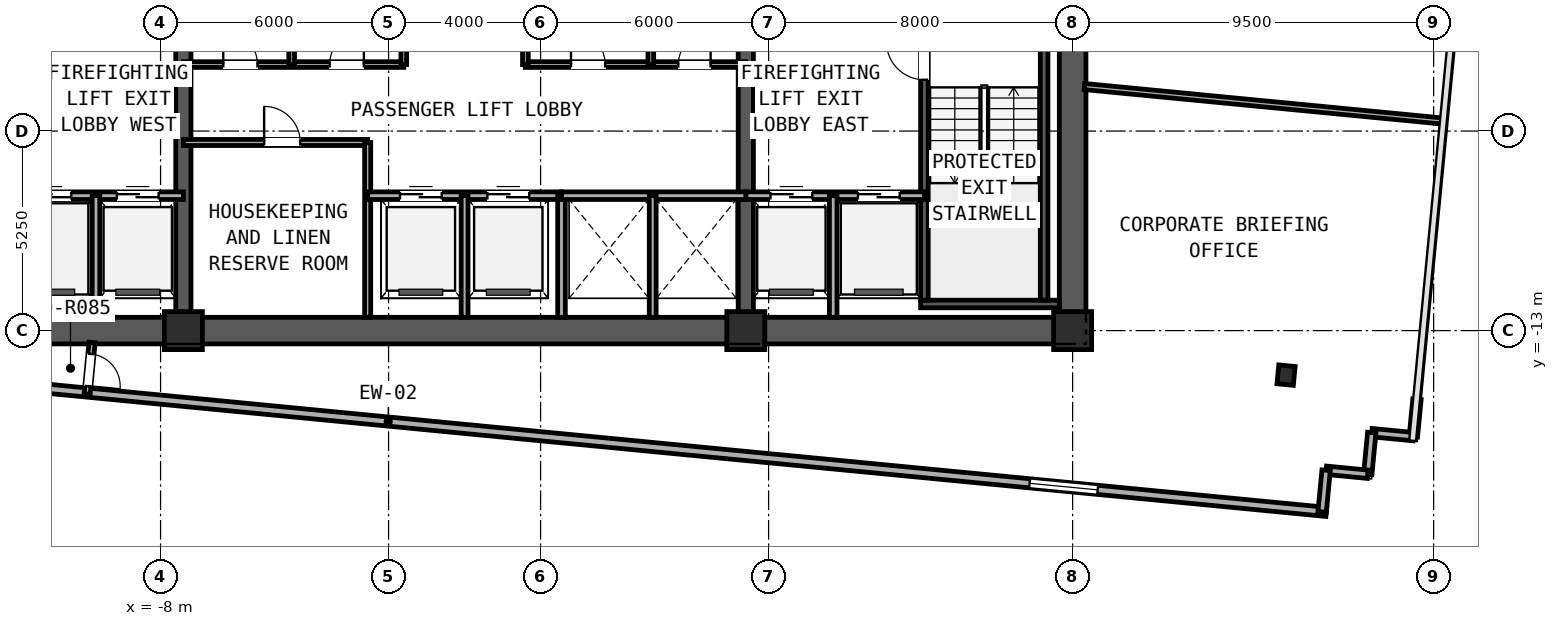
"""IFC4 building model, lengths in metres.
Left out: names, types, materials, properties, quantities, classifications, styles, units other than length and angle.
Written with IfcOpenShell. Run it as: python <this file> out.ifc"""

import sys

from ifc_helpers import new_model, si_unit, direction, frame, frame_2d, origin, origin_2d, place, context, subcontext, project, spatial, rectangle, i_section, extrude, element, fill, save


model = new_model("IFC4")
c1 = context("Model", 3, precision=1e-05, world=origin(), true_north=direction((0.0, 1.0)))
c2 = subcontext(c1, "Body", "Model", "MODEL_VIEW")
j1 = project(units=[si_unit("LENGTHUNIT", "METRE"), si_unit("PLANEANGLEUNIT", "RADIAN")], contexts=[c1])
p1 = place(None, origin())
s1 = spatial("IfcSite", under=j1, at=p1, CompositionType="ELEMENT")
p2 = place(p1, origin())
s2 = spatial("IfcBuilding", under=s1, at=p2, CompositionType="ELEMENT")
p3 = place(p2, frame((0.0, 0.0, 163.5)))
s3 = spatial("IfcBuildingStorey", under=s2, at=p3, CompositionType="ELEMENT", Elevation=163.5)
p4 = place(p3, frame((-16.35, -13.0, 0.0), z_axis=(0.0, 0.0, 1.0), x_axis=(1.0, 0.0, 0.0)))
e1 = element("IfcWall", 1, at=p4, inside=s3, PredefinedType="SHEAR", context=c2, shape_type="SweptSolid", body=[
    extrude(rectangle(XDim=32.7, YDim=0.7, at=frame_2d((16.35, 0.0))), origin(), (0.0, 0.0, 1.0), 2.91),
])
p5 = place(p3, frame((16.0, -12.65, 0.0), z_axis=(0.0, 0.0, 1.0), x_axis=(0.0, 1.0, 0.0)))
e2 = element("IfcWall", 2, at=p5, inside=s3, PredefinedType="SHEAR", context=c2, shape_type="SweptSolid", body=[
    extrude(rectangle(XDim=9.8, YDim=0.7, at=frame_2d((4.9, 0.0))), origin(), (0.0, 0.0, 1.0), 2.91),
])
for number, where, z_axis, x_axis in (
    (3, (-7.4, -12.65, 0.0), (0.0, 0.0, 1.0), (0.0, 1.0, 0.0)),
    (4, (7.4, -12.65, 0.0), (0.0, 0.0, 1.0), (0.0, 1.0, 0.0)),
):
    element("IfcWall", number, at=place(p3, frame(where, z_axis=z_axis, x_axis=x_axis)), inside=s3, PredefinedType="SHEAR", context=c2, shape_type="SweptSolid", body=[
        extrude(rectangle(XDim=9.8, YDim=0.4, at=frame_2d((4.9, 0.0))), origin(), (0.0, 0.0, 1.0), 3.19),
    ])
p6 = place(p3, frame((12.0, -12.3, 0.0), z_axis=(0.0, 0.0, 1.0), x_axis=(1.0, 0.0, 0.0)))
e5 = element("IfcWall", 5, at=p6, inside=s3, PredefinedType="SOLIDWALL", context=c2, shape_type="SweptSolid", body=[
    extrude(rectangle(XDim=3.65, YDim=0.2, at=frame_2d((1.825, 0.0))), origin(), (0.0, 0.0, 1.0), 3.19),
])
p7 = place(p3, frame((12.1, -12.2, 0.0), z_axis=(0.0, 0.0, 1.0), x_axis=(0.0, 1.0, 0.0)))
e6 = element("IfcWall", 6, at=p7, inside=s3, PredefinedType="SOLIDWALL", context=c2, shape_type="SweptSolid", body=[
    extrude(rectangle(XDim=7.0, YDim=0.2, at=frame_2d((3.5, 0.0))), origin(), (0.0, 0.0, 1.0), 3.19),
])
p8 = place(p7, frame((5.8, 0.0, 0.0)))
e7 = element("IfcOpeningElement", 7, at=p8, cuts=e6, PredefinedType="OPENING", context=c2, shape_type="SweptSolid", body=[
    extrude(rectangle(XDim=1.0, YDim=2.1, at=frame_2d((0.5, 1.05))), frame((0.0, 0.11, 0.0), z_axis=(0.0, -1.0, 0.0), x_axis=(1.0, 0.0, 0.0)), (0.0, 0.0, 1.0), 0.22),
])
p9 = place(p3, frame((15.25, -12.2, 0.0), z_axis=(0.0, 0.0, 1.0), x_axis=(0.0, 1.0, 0.0)))
e8 = element("IfcWall", 8, at=p9, inside=s3, PredefinedType="SOLIDWALL", context=c2, shape_type="SweptSolid", body=[
    extrude(rectangle(XDim=7.0, YDim=0.2, at=frame_2d((3.5, 0.0))), origin(), (0.0, 0.0, 1.0), 3.19),
])
for number, where, z_axis, x_axis in (
    (9, (-7.4, -13.0, 0.0), (0.0, 0.0, 1.0), (1.0, 0.0, 0.0)),
    (10, (7.4, -13.0, 0.0), (0.0, 0.0, 1.0), (1.0, 0.0, 0.0)),
    (11, (16.0, -13.0, 0.0), (0.0, 0.0, 1.0), (1.0, 0.0, 0.0)),
):
    element("IfcColumn", number, at=place(p3, frame(where, z_axis=z_axis, x_axis=x_axis)), inside=s3, PredefinedType="COLUMN", context=c2, shape_type="SweptSolid", body=[
        extrude(rectangle(XDim=1.0, YDim=1.0, at=origin_2d()), origin(), (0.0, 0.0, 1.0), 3.45),
    ])
p10 = place(p3, frame((21.616, -14.172, 0.0), z_axis=(0.0, 0.0, 1.0), x_axis=(0.995396198367, -0.09584575252, 0.0)))
e12 = element("IfcColumn", 12, at=p10, inside=s3, PredefinedType="COLUMN", context=c2, shape_type="SweptSolid", body=[
    extrude(i_section(OverallWidth=0.432, OverallDepth=0.498, WebThickness=0.056, FlangeThickness=0.089, FilletRadius=0.031, at=origin_2d()), origin(), (0.0, 0.0, 1.0), 3.45),
])
p11 = place(p3, frame((-26.695, -13.016, 0.0), z_axis=(0.0, 0.0, 1.0), x_axis=(0.995396268366, -0.095845025554, 0.0)))
e13 = element("IfcWall", 13, at=p11, inside=s3, PredefinedType="STANDARD", context=c2, shape_type="SweptSolid", body=[
    extrude(rectangle(XDim=49.6, YDim=0.24, at=frame_2d((24.8, 0.0))), origin(), (0.0, 0.0, 1.0), 3.19),
])
p12 = place(p11, frame((6.044, 0.0, 0.7)))
e14 = element("IfcOpeningElement", 14, at=p12, cuts=e13, PredefinedType="OPENING", context=c2, shape_type="SweptSolid", body=[
    extrude(rectangle(XDim=1.8, YDim=1.5, at=frame_2d((0.9, 0.75))), frame((0.0, 0.13, 0.0), z_axis=(0.0, -1.0, 0.0), x_axis=(1.0, 0.0, 0.0)), (0.0, 0.0, 1.0), 0.26),
])
p13 = place(p11, frame((41.756, 0.0, 0.7)))
e15 = element("IfcOpeningElement", 15, at=p13, cuts=e13, PredefinedType="OPENING", context=c2, shape_type="SweptSolid", body=[
    extrude(rectangle(XDim=1.8, YDim=1.5, at=frame_2d((0.9, 0.75))), frame((0.0, 0.13, 0.0), z_axis=(0.0, -1.0, 0.0), x_axis=(1.0, 0.0, 0.0)), (0.0, 0.0, 1.0), 0.26),
])
p14 = place(p3, frame((25.062, -14.805, 0.0), z_axis=(0.0, 0.0, 1.0), x_axis=(-0.095914428506, -0.995389583231, 0.0)))
e16 = element("IfcWall", 16, at=p14, inside=s3, PredefinedType="STANDARD", context=c2, shape_type="SweptSolid", body=[
    extrude(rectangle(XDim=0.99, YDim=0.22, at=frame_2d((0.495, 0.0))), origin(), (0.0, 0.0, 1.0), 3.19),
])
for number, where, z_axis, x_axis in (
    (17, (24.967, -15.791, 0.0), (0.0, 0.0, 1.0), (-0.995, 0.096, 0.0)),
    (18, (23.872, -15.685, 0.0), (0.0, 0.0, 1.0), (-0.096, -0.995, 0.0)),
    (19, (23.766, -16.78, 0.0), (0.0, 0.0, 1.0), (-0.995, 0.096, 0.0)),
    (20, (22.671, -16.675, 0.0), (0.0, 0.0, 1.0), (-0.096, -0.995, 0.0)),
):
    element("IfcWall", number, at=place(p3, frame(where, z_axis=z_axis, x_axis=x_axis)), inside=s3, PredefinedType="STANDARD", context=c2, shape_type="SweptSolid", body=[
        extrude(rectangle(XDim=1.1, YDim=0.22, at=frame_2d((0.55, 0.0))), origin(), (0.0, 0.0, 1.0), 3.19),
    ])
p15 = place(p3, frame((-12.1, -9.45, 0.0), z_axis=(0.0, 0.0, 1.0), x_axis=(1.0, 0.0, 0.0)))
e21 = element("IfcWall", 21, at=p15, inside=s3, PredefinedType="PARTITIONING", context=c2, shape_type="SweptSolid", body=[
    extrude(rectangle(XDim=4.7, YDim=0.2, at=frame_2d((2.35, 0.0))), origin(), (0.0, 0.0, 1.0), 3.19),
])
p16 = place(p15, frame((0.65, 0.0, 0.0)))
e22 = element("IfcOpeningElement", 22, at=p16, cuts=e21, PredefinedType="OPENING", context=c2, shape_type="SweptSolid", body=[
    extrude(rectangle(XDim=1.1, YDim=2.2, at=frame_2d((0.55, 1.1))), frame((0.0, 0.11, 0.0), z_axis=(0.0, -1.0, 0.0), x_axis=(1.0, 0.0, 0.0)), (0.0, 0.0, 1.0), 0.22),
])
p17 = place(p15, frame((2.95, 0.0, 0.0)))
e23 = element("IfcOpeningElement", 23, at=p17, cuts=e21, PredefinedType="OPENING", context=c2, shape_type="SweptSolid", body=[
    extrude(rectangle(XDim=1.1, YDim=2.2, at=frame_2d((0.55, 1.1))), frame((0.0, 0.11, 0.0), z_axis=(0.0, -1.0, 0.0), x_axis=(1.0, 0.0, 0.0)), (0.0, 0.0, 1.0), 0.22),
])
p18 = place(p3, frame((-9.7, -12.65, 0.0), z_axis=(0.0, 0.0, 1.0), x_axis=(0.0, 1.0, 0.0)))
e24 = element("IfcWall", 24, at=p18, inside=s3, PredefinedType="PARTITIONING", context=c2, shape_type="SweptSolid", body=[
    extrude(rectangle(XDim=3.2, YDim=0.2, at=frame_2d((1.6, 0.0))), origin(), (0.0, 0.0, 1.0), 2.225),
])
p19 = place(p3, frame((7.4, -9.45, 0.0), z_axis=(0.0, 0.0, 1.0), x_axis=(1.0, 0.0, 0.0)))
e25 = element("IfcWall", 25, at=p19, inside=s3, PredefinedType="PARTITIONING", context=c2, shape_type="SweptSolid", body=[
    extrude(rectangle(XDim=4.7, YDim=0.2, at=frame_2d((2.35, 0.0))), origin(), (0.0, 0.0, 1.0), 3.19),
])
p20 = place(p19, frame((2.95, 0.0, 0.0)))
e26 = element("IfcOpeningElement", 26, at=p20, cuts=e25, PredefinedType="OPENING", context=c2, shape_type="SweptSolid", body=[
    extrude(rectangle(XDim=1.1, YDim=2.2, at=frame_2d((0.55, 1.1))), frame((0.0, 0.11, 0.0), z_axis=(0.0, -1.0, 0.0), x_axis=(1.0, 0.0, 0.0)), (0.0, 0.0, 1.0), 0.22),
])
p21 = place(p19, frame((0.65, 0.0, 0.0)))
e27 = element("IfcOpeningElement", 27, at=p21, cuts=e25, PredefinedType="OPENING", context=c2, shape_type="SweptSolid", body=[
    extrude(rectangle(XDim=1.1, YDim=2.2, at=frame_2d((0.55, 1.1))), frame((0.0, 0.11, 0.0), z_axis=(0.0, -1.0, 0.0), x_axis=(1.0, 0.0, 0.0)), (0.0, 0.0, 1.0), 0.22),
])
p22 = place(p3, frame((9.7, -12.65, 0.0), z_axis=(0.0, 0.0, 1.0), x_axis=(0.0, 1.0, 0.0)))
e28 = element("IfcWall", 28, at=p22, inside=s3, PredefinedType="PARTITIONING", context=c2, shape_type="SweptSolid", body=[
    extrude(rectangle(XDim=3.2, YDim=0.2, at=frame_2d((1.6, 0.0))), origin(), (0.0, 0.0, 1.0), 2.225),
])
p23 = place(p3, frame((-7.4, -8.05, 0.0), z_axis=(0.0, 0.0, 1.0), x_axis=(1.0, 0.0, 0.0)))
e29 = element("IfcWall", 29, at=p23, inside=s3, PredefinedType="PARTITIONING", context=c2, shape_type="SweptSolid", body=[
    extrude(rectangle(XDim=4.85, YDim=0.16, at=frame_2d((2.425, 0.0))), origin(), (0.0, 0.0, 1.0), 3.19),
])
p24 = place(p23, frame((2.125, 0.0, 0.0)))
e30 = element("IfcOpeningElement", 30, at=p24, cuts=e29, PredefinedType="OPENING", context=c2, shape_type="SweptSolid", body=[
    extrude(rectangle(XDim=0.95, YDim=2.15, at=frame_2d((0.475, 1.075))), frame((0.0, 0.09, 0.0), z_axis=(0.0, -1.0, 0.0), x_axis=(1.0, 0.0, 0.0)), (0.0, 0.0, 1.0), 0.18),
])
p25 = place(p3, frame((-2.55, -12.65, 0.0), z_axis=(0.0, 0.0, 1.0), x_axis=(0.0, 1.0, 0.0)))
e31 = element("IfcWall", 31, at=p25, inside=s3, PredefinedType="PARTITIONING", context=c2, shape_type="SweptSolid", body=[
    extrude(rectangle(XDim=4.6, YDim=0.16, at=frame_2d((2.3, 0.0))), origin(), (0.0, 0.0, 1.0), 2.225),
])
p26 = place(p3, frame((-2.55, -9.45, 0.0), z_axis=(0.0, 0.0, 1.0), x_axis=(1.0, 0.0, 0.0)))
e32 = element("IfcWall", 32, at=p26, inside=s3, PredefinedType="PARTITIONING", context=c2, shape_type="SweptSolid", body=[
    extrude(rectangle(XDim=5.1, YDim=0.2, at=frame_2d((2.55, 0.0))), origin(), (0.0, 0.0, 1.0), 3.19),
])
p27 = place(p26, frame((0.85, 0.0, 0.0)))
e33 = element("IfcOpeningElement", 33, at=p27, cuts=e32, PredefinedType="OPENING", context=c2, shape_type="SweptSolid", body=[
    extrude(rectangle(XDim=1.1, YDim=2.2, at=frame_2d((0.55, 1.1))), frame((0.0, 0.11, 0.0), z_axis=(0.0, -1.0, 0.0), x_axis=(1.0, 0.0, 0.0)), (0.0, 0.0, 1.0), 0.22),
])
p28 = place(p26, frame((3.15, 0.0, 0.0)))
e34 = element("IfcOpeningElement", 34, at=p28, cuts=e32, PredefinedType="OPENING", context=c2, shape_type="SweptSolid", body=[
    extrude(rectangle(XDim=1.1, YDim=2.2, at=frame_2d((0.55, 1.1))), frame((0.0, 0.11, 0.0), z_axis=(0.0, -1.0, 0.0), x_axis=(1.0, 0.0, 0.0)), (0.0, 0.0, 1.0), 0.22),
])
p29 = place(p3, frame((0.0, -12.65, 0.0), z_axis=(0.0, 0.0, 1.0), x_axis=(0.0, 1.0, 0.0)))
e35 = element("IfcWall", 35, at=p29, inside=s3, PredefinedType="PARTITIONING", context=c2, shape_type="SweptSolid", body=[
    extrude(rectangle(XDim=3.2, YDim=0.18, at=frame_2d((1.6, 0.0))), origin(), (0.0, 0.0, 1.0), 2.225),
])
p30 = place(p3, frame((2.55, -12.65, 0.0), z_axis=(0.0, 0.0, 1.0), x_axis=(0.0, 1.0, 0.0)))
e36 = element("IfcWall", 36, at=p30, inside=s3, PredefinedType="PARTITIONING", context=c2, shape_type="SweptSolid", body=[
    extrude(rectangle(XDim=3.2, YDim=0.2, at=frame_2d((1.6, 0.0))), origin(), (0.0, 0.0, 1.0), 2.225),
])
p31 = place(p3, frame((2.55, -9.45, 0.0), z_axis=(0.0, 0.0, 1.0), x_axis=(1.0, 0.0, 0.0)))
e37 = element("IfcWall", 37, at=p31, inside=s3, PredefinedType="PARTITIONING", context=c2, shape_type="SweptSolid", body=[
    extrude(rectangle(XDim=4.85, YDim=0.2, at=frame_2d((2.425, 0.0))), origin(), (0.0, 0.0, 1.0), 3.19),
])
p32 = place(p3, frame((4.95, -12.65, 0.0), z_axis=(0.0, 0.0, 1.0), x_axis=(0.0, 1.0, 0.0)))
e38 = element("IfcWall", 38, at=p32, inside=s3, PredefinedType="PARTITIONING", context=c2, shape_type="SweptSolid", body=[
    extrude(rectangle(XDim=3.2, YDim=0.18, at=frame_2d((1.6, 0.0))), origin(), (0.0, 0.0, 1.0), 2.225),
])
p33 = place(p3, frame((-7.4, -6.0, 0.0), z_axis=(0.0, 0.0, 1.0), x_axis=(1.0, 0.0, 0.0)))
e39 = element("IfcWall", 39, at=p33, inside=s3, PredefinedType="PARTITIONING", context=c2, shape_type="SweptSolid", body=[
    extrude(rectangle(XDim=5.8, YDim=0.15, at=frame_2d((2.9, 0.0))), origin(), (0.0, 0.0, 1.0), 3.19),
])
p34 = place(p33, frame((1.05, 0.0, 0.0)))
e40 = element("IfcOpeningElement", 40, at=p34, cuts=e39, PredefinedType="OPENING", context=c2, shape_type="SweptSolid", body=[
    extrude(rectangle(XDim=0.9, YDim=2.1, at=frame_2d((0.45, 1.05))), frame((0.0, 0.085, 0.0), z_axis=(0.0, -1.0, 0.0), x_axis=(1.0, 0.0, 0.0)), (0.0, 0.0, 1.0), 0.17),
])
p35 = place(p33, frame((3.85, 0.0, 0.0)))
e41 = element("IfcOpeningElement", 41, at=p35, cuts=e39, PredefinedType="OPENING", context=c2, shape_type="SweptSolid", body=[
    extrude(rectangle(XDim=0.9, YDim=2.1, at=frame_2d((0.45, 1.05))), frame((0.0, 0.085, 0.0), z_axis=(0.0, -1.0, 0.0), x_axis=(1.0, 0.0, 0.0)), (0.0, 0.0, 1.0), 0.17),
])
p36 = place(p3, frame((-1.6, -6.0, 0.0), z_axis=(0.0, 0.0, 1.0), x_axis=(0.0, 1.0, 0.0)))
e42 = element("IfcWall", 42, at=p36, inside=s3, PredefinedType="PARTITIONING", context=c2, shape_type="SweptSolid", body=[
    extrude(rectangle(XDim=3.5, YDim=0.15, at=frame_2d((1.75, 0.0))), origin(), (0.0, 0.0, 1.0), 2.225),
])
p37 = place(p3, frame((1.6, -6.0, 0.0), z_axis=(0.0, 0.0, 1.0), x_axis=(1.0, 0.0, 0.0)))
e43 = element("IfcWall", 43, at=p37, inside=s3, PredefinedType="PARTITIONING", context=c2, shape_type="SweptSolid", body=[
    extrude(rectangle(XDim=5.8, YDim=0.15, at=frame_2d((2.9, 0.0))), origin(), (0.0, 0.0, 1.0), 3.19),
])
p38 = place(p37, frame((1.2, 0.0, 0.0)))
e44 = element("IfcOpeningElement", 44, at=p38, cuts=e43, PredefinedType="OPENING", context=c2, shape_type="SweptSolid", body=[
    extrude(rectangle(XDim=0.9, YDim=2.1, at=frame_2d((0.45, 1.05))), frame((0.0, 0.085, 0.0), z_axis=(0.0, -1.0, 0.0), x_axis=(1.0, 0.0, 0.0)), (0.0, 0.0, 1.0), 0.17),
])
p39 = place(p37, frame((4.025, 0.0, 0.0)))
e45 = element("IfcOpeningElement", 45, at=p39, cuts=e43, PredefinedType="OPENING", context=c2, shape_type="SweptSolid", body=[
    extrude(rectangle(XDim=0.85, YDim=2.05, at=frame_2d((0.425, 1.025))), frame((0.0, 0.085, 0.0), z_axis=(0.0, -1.0, 0.0), x_axis=(1.0, 0.0, 0.0)), (0.0, 0.0, 1.0), 0.17),
])
for number, where, z_axis, x_axis in (
    (46, (1.6, -6.0, 0.0), (0.0, 0.0, 1.0), (0.0, 1.0, 0.0)),
    (47, (-4.55, -6.0, 0.0), (0.0, 0.0, 1.0), (0.0, 1.0, 0.0)),
    (48, (4.9, -6.0, 0.0), (0.0, 0.0, 1.0), (0.0, 1.0, 0.0)),
):
    element("IfcWall", number, at=place(p3, frame(where, z_axis=z_axis, x_axis=x_axis)), inside=s3, PredefinedType="PARTITIONING", context=c2, shape_type="SweptSolid", body=[
        extrude(rectangle(XDim=3.5, YDim=0.15, at=frame_2d((1.75, 0.0))), origin(), (0.0, 0.0, 1.0), 2.225),
    ])
p40 = place(p3, frame((-9.802, -13.31, 0.0), z_axis=(0.0, 0.0, 1.0), x_axis=(-0.095930256126, -0.995388057975, 0.0)))
e49 = element("IfcWall", 49, at=p40, inside=s3, PredefinedType="PARTITIONING", context=c2, shape_type="SweptSolid", body=[
    extrude(rectangle(XDim=1.367, YDim=0.16, at=frame_2d((0.683, 0.0))), origin(), (0.0, 0.0, 1.0), 2.225),
])
p41 = place(p40, frame((0.306, 0.0, 0.0)))
e50 = element("IfcOpeningElement", 50, at=p41, cuts=e49, PredefinedType="OPENING", context=c2, shape_type="SweptSolid", body=[
    extrude(rectangle(XDim=0.85, YDim=2.05, at=frame_2d((0.425, 1.025))), frame((0.0, 0.09, 0.0), z_axis=(0.0, -1.0, 0.0), x_axis=(1.0, 0.0, 0.0)), (0.0, 0.0, 1.0), 0.18),
])
p42 = place(p3, frame((25.796, -7.492, 0.0), z_axis=(0.0, 0.0, 1.0), x_axis=(-0.995396487733, 0.095842747294, 0.0)))
e51 = element("IfcWall", 51, at=p42, inside=s3, PredefinedType="PARTITIONING", context=c2, shape_type="SweptSolid", body=[
    extrude(rectangle(XDim=9.53, YDim=0.16, at=frame_2d((4.765, 0.0))), origin(), (0.0, 0.0, 1.0), 2.225),
])
p43 = place(p13, origin())
e52 = element("IfcWindow", 52, at=p43, inside=s3, PartitioningType="SINGLE_PANEL", PredefinedType="WINDOW", context=c2, shape_type="SweptSolid", body=[
    extrude(rectangle(XDim=1.8, YDim=1.5, at=frame_2d((0.9, 0.75))), frame((0.0, 0.03, 0.0), z_axis=(0.0, -1.0, 0.0), x_axis=(1.0, 0.0, 0.0)), (0.0, 0.0, 1.0), 0.06),
])
fill(e15, e52)
p44 = place(p8, origin())
e53 = element("IfcDoor", 53, at=p44, inside=s3, OperationType="SINGLE_SWING_RIGHT", PredefinedType="DOOR", context=c2, shape_type="SweptSolid", body=[
    extrude(rectangle(XDim=1.0, YDim=2.1, at=frame_2d((0.5, 1.05))), frame((0.0, 0.025, 0.0), z_axis=(0.0, -1.0, 0.0), x_axis=(1.0, 0.0, 0.0)), (0.0, 0.0, 1.0), 0.05),
])
fill(e7, e53)
p45 = place(p16, origin())
e54 = element("IfcDoor", 54, at=p45, inside=s3, OperationType="SLIDING_TO_LEFT", PredefinedType="DOOR", context=c2, shape_type="SweptSolid", body=[
    extrude(rectangle(XDim=1.1, YDim=2.2, at=frame_2d((0.55, 1.1))), frame((0.0, 0.025, 0.0), z_axis=(0.0, -1.0, 0.0), x_axis=(1.0, 0.0, 0.0)), (0.0, 0.0, 1.0), 0.05),
])
fill(e22, e54)
p46 = place(p17, origin())
e55 = element("IfcDoor", 55, at=p46, inside=s3, OperationType="SLIDING_TO_RIGHT", PredefinedType="DOOR", context=c2, shape_type="SweptSolid", body=[
    extrude(rectangle(XDim=1.1, YDim=2.2, at=frame_2d((0.55, 1.1))), frame((0.0, 0.025, 0.0), z_axis=(0.0, -1.0, 0.0), x_axis=(1.0, 0.0, 0.0)), (0.0, 0.0, 1.0), 0.05),
])
fill(e23, e55)
p47 = place(p20, origin())
e56 = element("IfcDoor", 56, at=p47, inside=s3, OperationType="SLIDING_TO_LEFT", PredefinedType="DOOR", context=c2, shape_type="SweptSolid", body=[
    extrude(rectangle(XDim=1.1, YDim=2.2, at=frame_2d((0.55, 1.1))), frame((0.0, 0.025, 0.0), z_axis=(0.0, -1.0, 0.0), x_axis=(1.0, 0.0, 0.0)), (0.0, 0.0, 1.0), 0.05),
])
fill(e26, e56)
p48 = place(p21, origin())
e57 = element("IfcDoor", 57, at=p48, inside=s3, OperationType="SLIDING_TO_RIGHT", PredefinedType="DOOR", context=c2, shape_type="SweptSolid", body=[
    extrude(rectangle(XDim=1.1, YDim=2.2, at=frame_2d((0.55, 1.1))), frame((0.0, 0.025, 0.0), z_axis=(0.0, -1.0, 0.0), x_axis=(1.0, 0.0, 0.0)), (0.0, 0.0, 1.0), 0.05),
])
fill(e27, e57)
p49 = place(p24, origin())
e58 = element("IfcDoor", 58, at=p49, inside=s3, OperationType="SINGLE_SWING_LEFT", PredefinedType="DOOR", context=c2, shape_type="SweptSolid", body=[
    extrude(rectangle(XDim=0.95, YDim=2.15, at=frame_2d((0.475, 1.075))), frame((0.0, 0.025, 0.0), z_axis=(0.0, -1.0, 0.0), x_axis=(1.0, 0.0, 0.0)), (0.0, 0.0, 1.0), 0.05),
])
fill(e30, e58)
p50 = place(p27, origin())
e59 = element("IfcDoor", 59, at=p50, inside=s3, OperationType="SLIDING_TO_RIGHT", PredefinedType="DOOR", context=c2, shape_type="SweptSolid", body=[
    extrude(rectangle(XDim=1.1, YDim=2.2, at=frame_2d((0.55, 1.1))), frame((0.0, 0.025, 0.0), z_axis=(0.0, -1.0, 0.0), x_axis=(1.0, 0.0, 0.0)), (0.0, 0.0, 1.0), 0.05),
])
fill(e33, e59)
p51 = place(p28, origin())
e60 = element("IfcDoor", 60, at=p51, inside=s3, OperationType="SLIDING_TO_RIGHT", PredefinedType="DOOR", context=c2, shape_type="SweptSolid", body=[
    extrude(rectangle(XDim=1.1, YDim=2.2, at=frame_2d((0.55, 1.1))), frame((0.0, 0.025, 0.0), z_axis=(0.0, -1.0, 0.0), x_axis=(1.0, 0.0, 0.0)), (0.0, 0.0, 1.0), 0.05),
])
fill(e34, e60)
p52 = place(p34, frame((0.9, 0.0, 0.0), z_axis=(0.0, 0.0, 1.0), x_axis=(-1.0, 0.0, 0.0)))
e61 = element("IfcDoor", 61, at=p52, inside=s3, OperationType="SINGLE_SWING_LEFT", PredefinedType="DOOR", context=c2, shape_type="SweptSolid", body=[
    extrude(rectangle(XDim=0.9, YDim=2.1, at=frame_2d((0.45, 1.05))), frame((0.0, 0.025, 0.0), z_axis=(0.0, -1.0, 0.0), x_axis=(1.0, 0.0, 0.0)), (0.0, 0.0, 1.0), 0.05),
])
fill(e40, e61)
p53 = place(p35, frame((0.9, 0.0, 0.0), z_axis=(0.0, 0.0, 1.0), x_axis=(-1.0, 0.0, 0.0)))
e62 = element("IfcDoor", 62, at=p53, inside=s3, OperationType="SINGLE_SWING_RIGHT", PredefinedType="DOOR", context=c2, shape_type="SweptSolid", body=[
    extrude(rectangle(XDim=0.9, YDim=2.1, at=frame_2d((0.45, 1.05))), frame((0.0, 0.025, 0.0), z_axis=(0.0, -1.0, 0.0), x_axis=(1.0, 0.0, 0.0)), (0.0, 0.0, 1.0), 0.05),
])
fill(e41, e62)
p54 = place(p38, frame((0.9, 0.0, 0.0), z_axis=(0.0, 0.0, 1.0), x_axis=(-1.0, 0.0, 0.0)))
e63 = element("IfcDoor", 63, at=p54, inside=s3, OperationType="SINGLE_SWING_LEFT", PredefinedType="DOOR", context=c2, shape_type="SweptSolid", body=[
    extrude(rectangle(XDim=0.9, YDim=2.1, at=frame_2d((0.45, 1.05))), frame((0.0, 0.025, 0.0), z_axis=(0.0, -1.0, 0.0), x_axis=(1.0, 0.0, 0.0)), (0.0, 0.0, 1.0), 0.05),
])
fill(e44, e63)
p55 = place(p39, frame((0.85, 0.0, 0.0), z_axis=(0.0, 0.0, 1.0), x_axis=(-1.0, 0.0, 0.0)))
e64 = element("IfcDoor", 64, at=p55, inside=s3, OperationType="SINGLE_SWING_RIGHT", PredefinedType="DOOR", context=c2, shape_type="SweptSolid", body=[
    extrude(rectangle(XDim=0.85, YDim=2.05, at=frame_2d((0.425, 1.025))), frame((0.0, 0.025, 0.0), z_axis=(0.0, -1.0, 0.0), x_axis=(1.0, 0.0, 0.0)), (0.0, 0.0, 1.0), 0.05),
])
fill(e45, e64)
p56 = place(p41, frame((0.85, 0.0, 0.0), z_axis=(0.0, 0.0, 1.0), x_axis=(-1.0, 0.0, 0.0)))
e65 = element("IfcDoor", 65, at=p56, inside=s3, OperationType="SINGLE_SWING_RIGHT", PredefinedType="DOOR", context=c2, shape_type="SweptSolid", body=[
    extrude(rectangle(XDim=0.85, YDim=2.05, at=frame_2d((0.425, 1.025))), frame((0.0, 0.025, 0.0), z_axis=(0.0, -1.0, 0.0), x_axis=(1.0, 0.0, 0.0)), (0.0, 0.0, 1.0), 0.05),
])
fill(e50, e65)
save(model, sys.argv[1])
